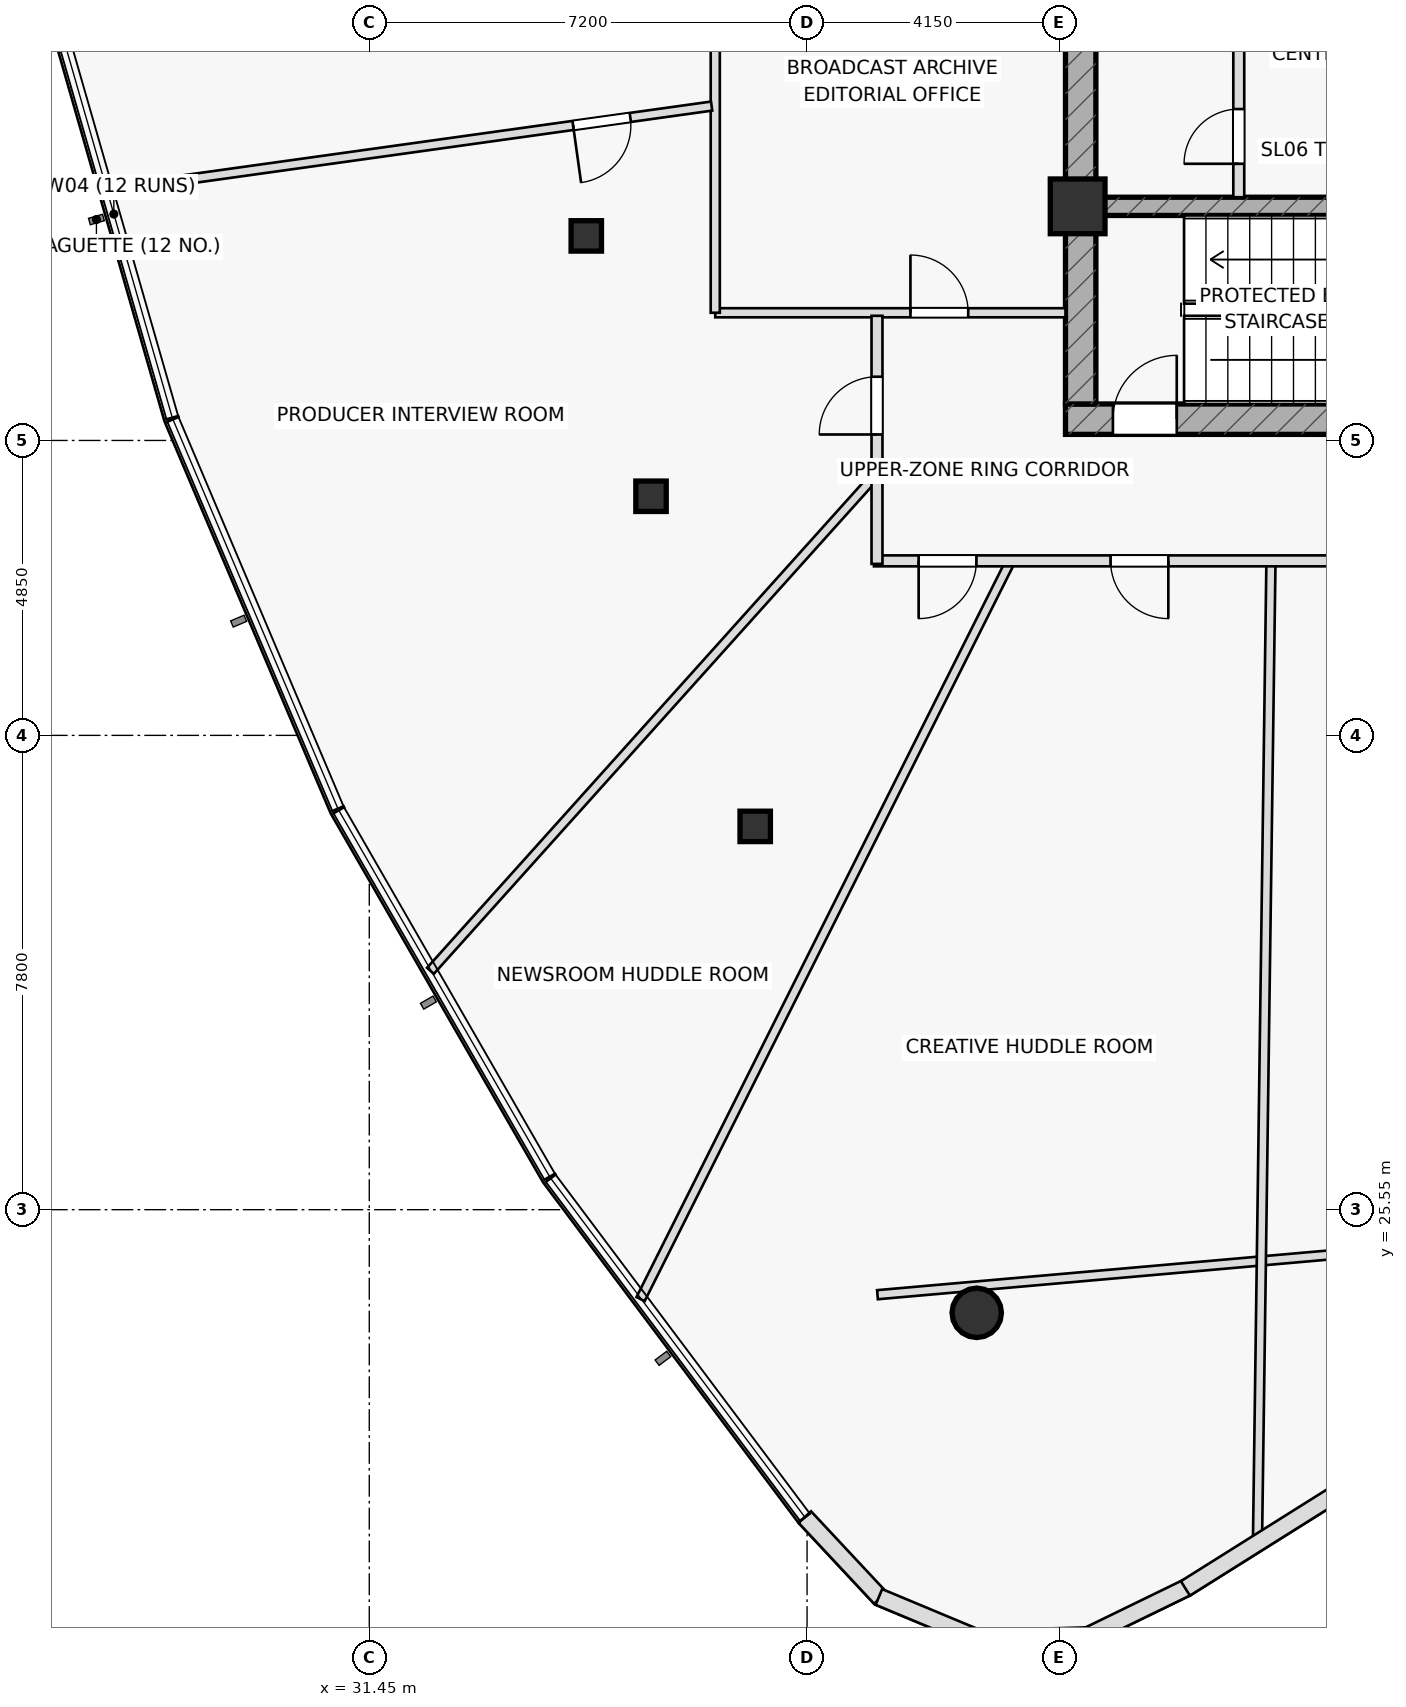
"""IFC4 building model, lengths in metres.
Left out: names, types, materials, properties, quantities, classifications, styles, units other than length and angle.
Written with IfcOpenShell. Run it as: python <this file> out.ifc"""

import sys

from ifc_helpers import new_model, si_unit, direction, frame, frame_2d, origin, origin_2d, place, context, subcontext, project, spatial, rectangle, hollow_rectangle, hollow_circle, extrude, element, fill, save


model = new_model("IFC4")
c1 = context("Model", 3, precision=1e-05, world=origin(), true_north=direction((0.0, 1.0)))
c2 = subcontext(c1, "Body", "Model", "MODEL_VIEW")
j1 = project(units=[si_unit("LENGTHUNIT", "METRE"), si_unit("PLANEANGLEUNIT", "RADIAN")], contexts=[c1])
p1 = place(None, origin())
s1 = spatial("IfcSite", under=j1, at=p1, CompositionType="ELEMENT")
p2 = place(p1, origin())
s2 = spatial("IfcBuilding", under=s1, at=p2, CompositionType="ELEMENT")
p3 = place(p2, frame((0.0, 0.0, 249.8)))
s3 = spatial("IfcBuildingStorey", under=s2, at=p3, CompositionType="ELEMENT", Elevation=249.8)
p4 = place(p3, frame((42.9, 38.55, 0.0), z_axis=(0.0, 0.0, 1.0), x_axis=(1.0, 0.0, 0.0)))
e1 = element("IfcWall", 1, at=p4, inside=s3, PredefinedType="SHEAR", context=c2, shape_type="SweptSolid", body=[
    extrude(rectangle(XDim=14.2, YDim=0.5, at=frame_2d((7.1, 0.0))), origin(), (0.0, 0.0, 1.0), 3.65),
])
p5 = place(p4, frame((0.78, 0.0, 0.0)))
e2 = element("IfcOpeningElement", 2, at=p5, cuts=e1, PredefinedType="OPENING", context=c2, shape_type="SweptSolid", body=[
    extrude(rectangle(XDim=1.05, YDim=2.2, at=frame_2d((0.525, 1.1))), frame((0.0, 0.26, 0.0), z_axis=(0.0, -1.0, 0.0), x_axis=(1.0, 0.0, 0.0)), (0.0, 0.0, 1.0), 0.52),
])
p6 = place(p3, frame((43.15, 38.8, 0.0), z_axis=(0.0, 0.0, 1.0), x_axis=(0.0, 1.0, 0.0)))
e3 = element("IfcWall", 3, at=p6, inside=s3, PredefinedType="SHEAR", context=c2, shape_type="SweptSolid", body=[
    extrude(rectangle(XDim=12.4, YDim=0.5, at=frame_2d((6.2, 0.0))), origin(), (0.0, 0.0, 1.0), 3.65),
])
p7 = place(p3, frame((43.4, 42.05, 0.0), z_axis=(0.0, 0.0, 1.0), x_axis=(1.0, 0.0, 0.0)))
e4 = element("IfcWall", 4, at=p7, inside=s3, PredefinedType="SHEAR", context=c2, shape_type="SweptSolid", body=[
    extrude(rectangle(XDim=13.2, YDim=0.3, at=frame_2d((6.6, 0.0))), origin(), (0.0, 0.0, 1.0), 3.65),
])
p8 = place(p7, frame((9.1, 0.0, 0.0)))
e5 = element("IfcOpeningElement", 5, at=p8, cuts=e4, PredefinedType="OPENING", context=c2, shape_type="SweptSolid", body=[
    extrude(rectangle(XDim=1.5, YDim=2.2, at=frame_2d((0.75, 1.1))), frame((0.0, 0.16, 0.0), z_axis=(0.0, -1.0, 0.0), x_axis=(1.0, 0.0, 0.0)), (0.0, 0.0, 1.0), 0.32),
])
p9 = place(p3, frame((43.1, 42.05, 0.0), z_axis=(0.0, 0.0, 1.0), x_axis=(1.0, 0.0, 0.0)))
e6 = element("IfcColumn", 6, at=p9, inside=s3, PredefinedType="COLUMN", context=c2, shape_type="SweptSolid", body=[
    extrude(rectangle(XDim=0.9, YDim=0.9, at=origin_2d()), origin(), (0.0, 0.0, 1.0), 3.65),
])
for number, where, z_axis, x_axis in (
    (7, (35.019, 41.564, 0.0), (0.0, 0.0, 1.0), (1.0, 0.0, 0.0)),
    (8, (36.083, 37.282, 0.0), (0.0, 0.0, 1.0), (1.0, 0.0, 0.0)),
    (9, (37.797, 31.853, 0.0), (0.0, 0.0, 1.0), (1.0, 0.0, 0.0)),
):
    element("IfcColumn", number, at=place(p3, frame(where, z_axis=z_axis, x_axis=x_axis)), inside=s3, PredefinedType="COLUMN", context=c2, shape_type="SweptSolid", body=[
        extrude(hollow_rectangle(XDim=0.5, YDim=0.5, WallThickness=0.03, at=origin_2d()), origin(), (0.0, 0.0, 1.0), 3.65),
    ])
p10 = place(p3, frame((41.44, 23.854, 0.0), z_axis=(0.0, 0.0, 1.0), x_axis=(1.0, 0.0, 0.0)))
e10 = element("IfcColumn", 10, at=p10, inside=s3, PredefinedType="COLUMN", context=c2, shape_type="SweptSolid", body=[
    extrude(hollow_circle(Radius=0.406, WallThickness=0.036, at=origin_2d()), origin(), (0.0, 0.0, 1.0), 3.65),
])
p11 = place(p3, frame((45.75, 42.2, 0.0), z_axis=(0.0, 0.0, 1.0), x_axis=(0.0, 1.0, 0.0)))
e11 = element("IfcWall", 11, at=p11, inside=s3, PredefinedType="PARTITIONING", context=c2, shape_type="SweptSolid", body=[
    extrude(rectangle(XDim=5.6, YDim=0.18, at=frame_2d((2.8, 0.0))), origin(), (0.0, 0.0, 1.0), 3.65),
])
p12 = place(p11, frame((0.55, 0.0, 0.0)))
e12 = element("IfcOpeningElement", 12, at=p12, cuts=e11, PredefinedType="OPENING", context=c2, shape_type="SweptSolid", body=[
    extrude(rectangle(XDim=0.9, YDim=2.05, at=frame_2d((0.45, 1.025))), frame((0.0, 0.1, 0.0), z_axis=(0.0, -1.0, 0.0), x_axis=(1.0, 0.0, 0.0)), (0.0, 0.0, 1.0), 0.2),
])
p13 = place(p11, frame((2.9, 0.0, 0.0)))
e13 = element("IfcOpeningElement", 13, at=p13, cuts=e11, PredefinedType="OPENING", context=c2, shape_type="SweptSolid", body=[
    extrude(rectangle(XDim=0.85, YDim=2.05, at=frame_2d((0.425, 1.025))), frame((0.0, 0.1, 0.0), z_axis=(0.0, -1.0, 0.0), x_axis=(1.0, 0.0, 0.0)), (0.0, 0.0, 1.0), 0.2),
])
p14 = place(p3, frame((39.808, 24.152, 0.0), z_axis=(0.0, 0.0, 1.0), x_axis=(0.996153584085, 0.087624408208, 0.0)))
e14 = element("IfcWall", 14, at=p14, inside=s3, PredefinedType="PARTITIONING", context=c2, shape_type="SweptSolid", body=[
    extrude(rectangle(XDim=10.632, YDim=0.15, at=frame_2d((5.316, 0.0))), origin(), (0.0, 0.0, 1.0), 3.175),
])
p15 = place(p3, frame((37.14, 40.3, 0.0), z_axis=(0.0, 0.0, 1.0), x_axis=(1.0, 0.0, 0.0)))
e15 = element("IfcWall", 15, at=p15, inside=s3, PredefinedType="PARTITIONING", context=c2, shape_type="SweptSolid", body=[
    extrude(rectangle(XDim=5.76, YDim=0.15, at=frame_2d((2.88, 0.0))), origin(), (0.0, 0.0, 1.0), 3.075),
])
p16 = place(p15, frame((3.21, 0.0, 0.0)))
e16 = element("IfcOpeningElement", 16, at=p16, cuts=e15, PredefinedType="OPENING", context=c2, shape_type="SweptSolid", body=[
    extrude(rectangle(XDim=0.95, YDim=2.05, at=frame_2d((0.475, 1.025))), frame((0.0, 0.085, 0.0), z_axis=(0.0, -1.0, 0.0), x_axis=(1.0, 0.0, 0.0)), (0.0, 0.0, 1.0), 0.17),
])
p17 = place(p3, frame((37.14, 40.3, 0.0), z_axis=(0.0, 0.0, 1.0), x_axis=(0.0, 1.0, 0.0)))
e17 = element("IfcWall", 17, at=p17, inside=s3, PredefinedType="PARTITIONING", context=c2, shape_type="SweptSolid", body=[
    extrude(rectangle(XDim=7.58, YDim=0.15, at=frame_2d((3.79, 0.0))), origin(), (0.0, 0.0, 1.0), 3.65),
])
p18 = place(p3, frame((37.08, 43.699, 0.0), z_axis=(0.0, 0.0, 1.0), x_axis=(-0.99039205397, -0.138288030693, 0.0)))
e18 = element("IfcWall", 18, at=p18, inside=s3, PredefinedType="PARTITIONING", context=c2, shape_type="SweptSolid", body=[
    extrude(rectangle(XDim=10.049, YDim=0.15, at=frame_2d((5.024, 0.0))), origin(), (0.0, 0.0, 1.0), 3.175),
])
p19 = place(p18, frame((1.35, 0.0, 0.0)))
e19 = element("IfcOpeningElement", 19, at=p19, cuts=e18, PredefinedType="OPENING", context=c2, shape_type="SweptSolid", body=[
    extrude(rectangle(XDim=0.95, YDim=2.05, at=frame_2d((0.475, 1.025))), frame((0.0, 0.085, 0.0), z_axis=(0.0, -1.0, 0.0), x_axis=(1.0, 0.0, 0.0)), (0.0, 0.0, 1.0), 0.17),
])
p20 = place(p3, frame((39.8, 37.653, 0.0), z_axis=(0.0, 0.0, 1.0), x_axis=(-0.668272193599, -0.743916847008, 0.0)))
e20 = element("IfcWall", 20, at=p20, inside=s3, PredefinedType="PARTITIONING", context=c2, shape_type="SweptSolid", body=[
    extrude(rectangle(XDim=10.99, YDim=0.15, at=frame_2d((5.495, 0.0))), origin(), (0.0, 0.0, 1.0), 3.175),
])
p21 = place(p3, frame((41.998, 36.22, 0.0), z_axis=(0.0, 0.0, 1.0), x_axis=(-0.448162520619, -0.893952098891, 0.0)))
e21 = element("IfcWall", 21, at=p21, inside=s3, PredefinedType="PARTITIONING", context=c2, shape_type="SweptSolid", body=[
    extrude(rectangle(XDim=13.581, YDim=0.15, at=frame_2d((6.791, 0.0))), origin(), (0.0, 0.0, 1.0), 3.175),
])
p22 = place(p3, frame((46.279, 36.22, 0.0), z_axis=(0.0, 0.0, 1.0), x_axis=(-0.013742019397, -0.999905573993, 0.0)))
e22 = element("IfcWall", 22, at=p22, inside=s3, PredefinedType="PARTITIONING", context=c2, shape_type="SweptSolid", body=[
    extrude(rectangle(XDim=16.167, YDim=0.15, at=frame_2d((8.083, 0.0))), origin(), (0.0, 0.0, 1.0), 3.075),
])
p23 = place(p3, frame((59.23, 36.22, 0.0), z_axis=(0.0, 0.0, 1.0), x_axis=(-1.0, 0.0, 0.0)))
e23 = element("IfcWall", 23, at=p23, inside=s3, PredefinedType="PARTITIONING", context=c2, shape_type="SweptSolid", body=[
    extrude(rectangle(XDim=19.48, YDim=0.18, at=frame_2d((9.74, 0.0))), origin(), (0.0, 0.0, 1.0), 3.075),
])
p24 = place(p23, frame((6.119, 0.0, 0.0)))
e24 = element("IfcOpeningElement", 24, at=p24, cuts=e23, PredefinedType="OPENING", context=c2, shape_type="SweptSolid", body=[
    extrude(rectangle(XDim=0.95, YDim=2.05, at=frame_2d((0.475, 1.025))), frame((0.0, 0.1, 0.0), z_axis=(0.0, -1.0, 0.0), x_axis=(1.0, 0.0, 0.0)), (0.0, 0.0, 1.0), 0.2),
])
p25 = place(p23, frame((14.639, 0.0, 0.0)))
e25 = element("IfcOpeningElement", 25, at=p25, cuts=e23, PredefinedType="OPENING", context=c2, shape_type="SweptSolid", body=[
    extrude(rectangle(XDim=0.95, YDim=2.05, at=frame_2d((0.475, 1.025))), frame((0.0, 0.1, 0.0), z_axis=(0.0, -1.0, 0.0), x_axis=(1.0, 0.0, 0.0)), (0.0, 0.0, 1.0), 0.2),
])
p26 = place(p23, frame((17.795, 0.0, 0.0)))
e26 = element("IfcOpeningElement", 26, at=p26, cuts=e23, PredefinedType="OPENING", context=c2, shape_type="SweptSolid", body=[
    extrude(rectangle(XDim=0.95, YDim=2.05, at=frame_2d((0.475, 1.025))), frame((0.0, 0.1, 0.0), z_axis=(0.0, -1.0, 0.0), x_axis=(1.0, 0.0, 0.0)), (0.0, 0.0, 1.0), 0.2),
])
p27 = place(p3, frame((39.8, 36.17, 0.0), z_axis=(0.0, 0.0, 1.0), x_axis=(0.0, 1.0, 0.0)))
e27 = element("IfcWall", 27, at=p27, inside=s3, PredefinedType="PARTITIONING", context=c2, shape_type="SweptSolid", body=[
    extrude(rectangle(XDim=4.08, YDim=0.18, at=frame_2d((2.04, 0.0))), origin(), (0.0, 0.0, 1.0), 3.355),
])
p28 = place(p27, frame((2.128, 0.0, 0.0)))
e28 = element("IfcOpeningElement", 28, at=p28, cuts=e27, PredefinedType="OPENING", context=c2, shape_type="SweptSolid", body=[
    extrude(rectangle(XDim=0.95, YDim=2.05, at=frame_2d((0.475, 1.025))), frame((0.0, 0.1, 0.0), z_axis=(0.0, -1.0, 0.0), x_axis=(1.0, 0.0, 0.0)), (0.0, 0.0, 1.0), 0.2),
])
p29 = place(p3, frame((38.613, 20.495, 0.0), z_axis=(0.0, 0.0, 1.0), x_axis=(0.682624001525, -0.730769780808, 0.0)))
e29 = element("IfcWall", 29, at=p29, inside=s3, PredefinedType="STANDARD", context=c2, shape_type="SweptSolid", body=[
    extrude(rectangle(XDim=1.821, YDim=0.28, at=frame_2d((0.91, 0.0))), origin(), (0.0, 0.0, 1.0), 3.65),
])
p30 = place(p3, frame((39.831, 19.181, 0.0), z_axis=(0.0, 0.0, 1.0), x_axis=(0.92282514469, -0.385219096526, 0.0)))
e30 = element("IfcWall", 30, at=p30, inside=s3, PredefinedType="STANDARD", context=c2, shape_type="SweptSolid", body=[
    extrude(rectangle(XDim=1.809, YDim=0.28, at=frame_2d((0.904, 0.0))), origin(), (0.0, 0.0, 1.0), 3.65),
])
p31 = place(p3, frame((43.251, 18.535, 0.0), z_axis=(0.0, 0.0, 1.0), x_axis=(0.899201068585, 0.437535642268, 0.0)))
e31 = element("IfcWall", 31, at=p31, inside=s3, PredefinedType="STANDARD", context=c2, shape_type="SweptSolid", body=[
    extrude(rectangle(XDim=1.831, YDim=0.28, at=frame_2d((0.916, 0.0))), origin(), (0.0, 0.0, 1.0), 3.65),
])
p32 = place(p3, frame((44.872, 19.322, 0.0), z_axis=(0.0, 0.0, 1.0), x_axis=(0.846910346194, 0.531735710207, 0.0)))
e32 = element("IfcWall", 32, at=p32, inside=s3, PredefinedType="STANDARD", context=c2, shape_type="SweptSolid", body=[
    extrude(rectangle(XDim=7.033, YDim=0.28, at=frame_2d((3.517, 0.0))), origin(), (0.0, 0.0, 1.0), 3.65),
])
p33 = place(p5, origin())
e33 = element("IfcDoor", 33, at=p33, inside=s3, OperationType="SINGLE_SWING_RIGHT", PredefinedType="DOOR", context=c2, shape_type="SweptSolid", body=[
    extrude(rectangle(XDim=1.05, YDim=2.2, at=frame_2d((0.525, 1.1))), frame((0.0, 0.025, 0.0), z_axis=(0.0, -1.0, 0.0), x_axis=(1.0, 0.0, 0.0)), (0.0, 0.0, 1.0), 0.05),
])
fill(e2, e33)
p34 = place(p12, origin())
e34 = element("IfcDoor", 34, at=p34, inside=s3, OperationType="SINGLE_SWING_LEFT", PredefinedType="DOOR", context=c2, shape_type="SweptSolid", body=[
    extrude(rectangle(XDim=0.9, YDim=2.05, at=frame_2d((0.45, 1.025))), frame((0.0, 0.025, 0.0), z_axis=(0.0, -1.0, 0.0), x_axis=(1.0, 0.0, 0.0)), (0.0, 0.0, 1.0), 0.05),
])
fill(e12, e34)
p35 = place(p16, origin())
e35 = element("IfcDoor", 35, at=p35, inside=s3, OperationType="SINGLE_SWING_LEFT", PredefinedType="DOOR", context=c2, shape_type="SweptSolid", body=[
    extrude(rectangle(XDim=0.95, YDim=2.05, at=frame_2d((0.475, 1.025))), frame((0.0, 0.025, 0.0), z_axis=(0.0, -1.0, 0.0), x_axis=(1.0, 0.0, 0.0)), (0.0, 0.0, 1.0), 0.05),
])
fill(e16, e35)
p36 = place(p19, origin())
e36 = element("IfcDoor", 36, at=p36, inside=s3, OperationType="SINGLE_SWING_RIGHT", PredefinedType="DOOR", context=c2, shape_type="SweptSolid", body=[
    extrude(rectangle(XDim=0.95, YDim=2.05, at=frame_2d((0.475, 1.025))), frame((0.0, 0.025, 0.0), z_axis=(0.0, -1.0, 0.0), x_axis=(1.0, 0.0, 0.0)), (0.0, 0.0, 1.0), 0.05),
])
fill(e19, e36)
p37 = place(p25, origin())
e37 = element("IfcDoor", 37, at=p37, inside=s3, OperationType="SINGLE_SWING_LEFT", PredefinedType="DOOR", context=c2, shape_type="SweptSolid", body=[
    extrude(rectangle(XDim=0.95, YDim=2.05, at=frame_2d((0.475, 1.025))), frame((0.0, 0.025, 0.0), z_axis=(0.0, -1.0, 0.0), x_axis=(1.0, 0.0, 0.0)), (0.0, 0.0, 1.0), 0.05),
])
fill(e25, e37)
p38 = place(p26, origin())
e38 = element("IfcDoor", 38, at=p38, inside=s3, OperationType="SINGLE_SWING_RIGHT", PredefinedType="DOOR", context=c2, shape_type="SweptSolid", body=[
    extrude(rectangle(XDim=0.95, YDim=2.05, at=frame_2d((0.475, 1.025))), frame((0.0, 0.025, 0.0), z_axis=(0.0, -1.0, 0.0), x_axis=(1.0, 0.0, 0.0)), (0.0, 0.0, 1.0), 0.05),
])
fill(e26, e38)
p39 = place(p28, origin())
e39 = element("IfcDoor", 39, at=p39, inside=s3, OperationType="SINGLE_SWING_LEFT", PredefinedType="DOOR", context=c2, shape_type="SweptSolid", body=[
    extrude(rectangle(XDim=0.95, YDim=2.05, at=frame_2d((0.475, 1.025))), frame((0.0, 0.025, 0.0), z_axis=(0.0, -1.0, 0.0), x_axis=(1.0, 0.0, 0.0)), (0.0, 0.0, 1.0), 0.05),
])
fill(e28, e39)
save(model, sys.argv[1])
